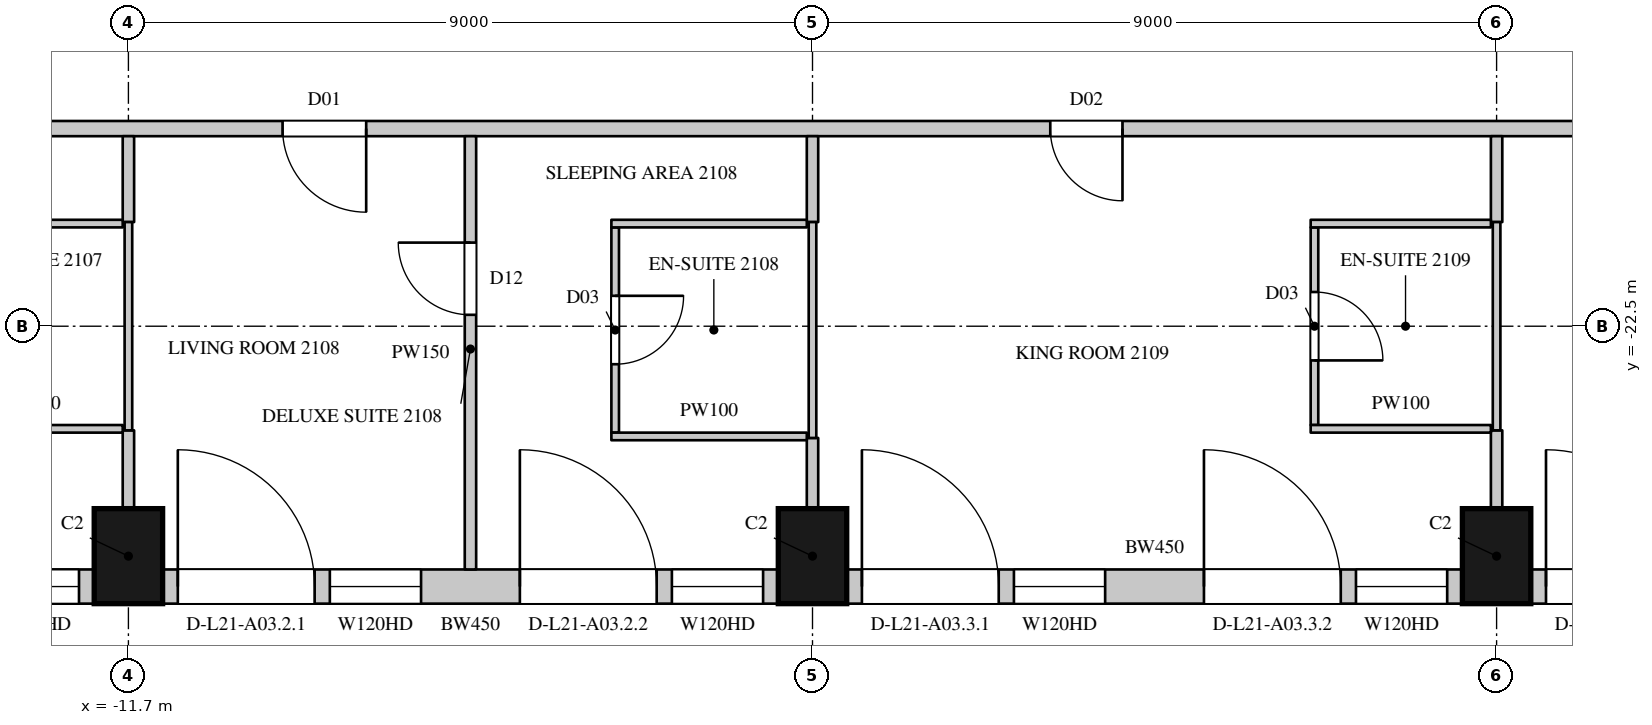
"""IFC4 building model, lengths in metres.
Left out: names, types, materials, properties, quantities, classifications, styles, units other than length and angle.
Written with IfcOpenShell. Run it as: python <this file> out.ifc"""

import sys

from ifc_helpers import new_model, si_unit, direction, frame, frame_2d, origin, origin_2d, place, context, subcontext, project, spatial, rectangle, extrude, element, fill, save


model = new_model("IFC4")
c1 = context("Model", 3, precision=1e-05, world=origin(), true_north=direction((0.0, 1.0)))
c2 = subcontext(c1, "Body", "Model", "MODEL_VIEW")
j1 = project(units=[si_unit("LENGTHUNIT", "METRE"), si_unit("PLANEANGLEUNIT", "RADIAN")], contexts=[c1])
p1 = place(None, origin())
s1 = spatial("IfcSite", under=j1, at=p1, CompositionType="ELEMENT")
p2 = place(p1, origin())
s2 = spatial("IfcBuilding", under=s1, at=p2, CompositionType="ELEMENT")
p3 = place(p2, frame((0.0, 0.0, 105.9)))
s3 = spatial("IfcBuildingStorey", under=s2, at=p3, CompositionType="ELEMENT", Elevation=105.9)
for number, where, z_axis, x_axis in (
    (1, (-11.7, -25.525, 0.0), (0.0, 0.0, 1.0), (1.0, 0.0, 0.0)),
    (2, (-2.7, -25.525, 0.0), (0.0, 0.0, 1.0), (1.0, 0.0, 0.0)),
    (3, (6.3, -25.525, 0.0), (0.0, 0.0, 1.0), (1.0, 0.0, 0.0)),
):
    element("IfcColumn", number, at=place(p3, frame(where, z_axis=z_axis, x_axis=x_axis)), inside=s3, PredefinedType="COLUMN", context=c2, shape_type="SweptSolid", body=[
        extrude(rectangle(XDim=0.9, YDim=1.25, at=origin_2d()), origin(), (0.0, 0.0, 1.0), 3.6),
    ])
p4 = place(p3, frame((-20.25, -25.925, 0.0), z_axis=(0.0, 0.0, 1.0), x_axis=(1.0, 0.0, 0.0)))
e4 = element("IfcWall", 4, at=p4, inside=s3, PredefinedType="SOLIDWALL", context=c2, shape_type="SweptSolid", body=[
    extrude(rectangle(XDim=8.1, YDim=0.45, at=frame_2d((4.05, 0.0))), origin(), (0.0, 0.0, 1.0), 3.3),
])
p5 = place(p4, frame((0.2, 0.0, 0.0)))
e5 = element("IfcOpeningElement", 5, at=p5, cuts=e4, PredefinedType="OPENING", context=c2, shape_type="SweptSolid", body=[
    extrude(rectangle(XDim=1.8, YDim=2.4, at=frame_2d((0.9, 1.2))), frame((0.0, 0.235, 0.0), z_axis=(0.0, -1.0, 0.0), x_axis=(1.0, 0.0, 0.0)), (0.0, 0.0, 1.0), 0.47),
])
p6 = place(p4, frame((2.2, 0.0, 1.05)))
e6 = element("IfcOpeningElement", 6, at=p6, cuts=e4, PredefinedType="OPENING", context=c2, shape_type="SweptSolid", body=[
    extrude(rectangle(XDim=1.2, YDim=2.0, at=frame_2d((0.6, 1.0))), frame((0.0, 0.235, 0.0), z_axis=(0.0, -1.0, 0.0), x_axis=(1.0, 0.0, 0.0)), (0.0, 0.0, 1.0), 0.47),
])
p7 = place(p4, frame((4.7, 0.0, 0.0)))
e7 = element("IfcOpeningElement", 7, at=p7, cuts=e4, PredefinedType="OPENING", context=c2, shape_type="SweptSolid", body=[
    extrude(rectangle(XDim=1.8, YDim=2.4, at=frame_2d((0.9, 1.2))), frame((0.0, 0.235, 0.0), z_axis=(0.0, -1.0, 0.0), x_axis=(1.0, 0.0, 0.0)), (0.0, 0.0, 1.0), 0.47),
])
p8 = place(p4, frame((6.7, 0.0, 1.05)))
e8 = element("IfcOpeningElement", 8, at=p8, cuts=e4, PredefinedType="OPENING", context=c2, shape_type="SweptSolid", body=[
    extrude(rectangle(XDim=1.2, YDim=2.0, at=frame_2d((0.6, 1.0))), frame((0.0, 0.235, 0.0), z_axis=(0.0, -1.0, 0.0), x_axis=(1.0, 0.0, 0.0)), (0.0, 0.0, 1.0), 0.47),
])
p9 = place(p3, frame((-11.25, -25.925, 0.0), z_axis=(0.0, 0.0, 1.0), x_axis=(1.0, 0.0, 0.0)))
e9 = element("IfcWall", 9, at=p9, inside=s3, PredefinedType="SOLIDWALL", context=c2, shape_type="SweptSolid", body=[
    extrude(rectangle(XDim=8.1, YDim=0.45, at=frame_2d((4.05, 0.0))), origin(), (0.0, 0.0, 1.0), 3.3),
])
p10 = place(p9, frame((0.2, 0.0, 0.0)))
e10 = element("IfcOpeningElement", 10, at=p10, cuts=e9, PredefinedType="OPENING", context=c2, shape_type="SweptSolid", body=[
    extrude(rectangle(XDim=1.8, YDim=2.4, at=frame_2d((0.9, 1.2))), frame((0.0, 0.235, 0.0), z_axis=(0.0, -1.0, 0.0), x_axis=(1.0, 0.0, 0.0)), (0.0, 0.0, 1.0), 0.47),
])
p11 = place(p9, frame((2.2, 0.0, 1.05)))
e11 = element("IfcOpeningElement", 11, at=p11, cuts=e9, PredefinedType="OPENING", context=c2, shape_type="SweptSolid", body=[
    extrude(rectangle(XDim=1.2, YDim=2.0, at=frame_2d((0.6, 1.0))), frame((0.0, 0.235, 0.0), z_axis=(0.0, -1.0, 0.0), x_axis=(1.0, 0.0, 0.0)), (0.0, 0.0, 1.0), 0.47),
])
p12 = place(p9, frame((4.7, 0.0, 0.0)))
e12 = element("IfcOpeningElement", 12, at=p12, cuts=e9, PredefinedType="OPENING", context=c2, shape_type="SweptSolid", body=[
    extrude(rectangle(XDim=1.8, YDim=2.4, at=frame_2d((0.9, 1.2))), frame((0.0, 0.235, 0.0), z_axis=(0.0, -1.0, 0.0), x_axis=(1.0, 0.0, 0.0)), (0.0, 0.0, 1.0), 0.47),
])
p13 = place(p9, frame((6.7, 0.0, 1.05)))
e13 = element("IfcOpeningElement", 13, at=p13, cuts=e9, PredefinedType="OPENING", context=c2, shape_type="SweptSolid", body=[
    extrude(rectangle(XDim=1.2, YDim=2.0, at=frame_2d((0.6, 1.0))), frame((0.0, 0.235, 0.0), z_axis=(0.0, -1.0, 0.0), x_axis=(1.0, 0.0, 0.0)), (0.0, 0.0, 1.0), 0.47),
])
p14 = place(p3, frame((-2.25, -25.925, 0.0), z_axis=(0.0, 0.0, 1.0), x_axis=(1.0, 0.0, 0.0)))
e14 = element("IfcWall", 14, at=p14, inside=s3, PredefinedType="SOLIDWALL", context=c2, shape_type="SweptSolid", body=[
    extrude(rectangle(XDim=8.1, YDim=0.45, at=frame_2d((4.05, 0.0))), origin(), (0.0, 0.0, 1.0), 3.3),
])
p15 = place(p14, frame((0.2, 0.0, 0.0)))
e15 = element("IfcOpeningElement", 15, at=p15, cuts=e14, PredefinedType="OPENING", context=c2, shape_type="SweptSolid", body=[
    extrude(rectangle(XDim=1.8, YDim=2.4, at=frame_2d((0.9, 1.2))), frame((0.0, 0.235, 0.0), z_axis=(0.0, -1.0, 0.0), x_axis=(1.0, 0.0, 0.0)), (0.0, 0.0, 1.0), 0.47),
])
p16 = place(p14, frame((2.2, 0.0, 1.05)))
e16 = element("IfcOpeningElement", 16, at=p16, cuts=e14, PredefinedType="OPENING", context=c2, shape_type="SweptSolid", body=[
    extrude(rectangle(XDim=1.2, YDim=2.0, at=frame_2d((0.6, 1.0))), frame((0.0, 0.235, 0.0), z_axis=(0.0, -1.0, 0.0), x_axis=(1.0, 0.0, 0.0)), (0.0, 0.0, 1.0), 0.47),
])
p17 = place(p14, frame((4.7, 0.0, 0.0)))
e17 = element("IfcOpeningElement", 17, at=p17, cuts=e14, PredefinedType="OPENING", context=c2, shape_type="SweptSolid", body=[
    extrude(rectangle(XDim=1.8, YDim=2.4, at=frame_2d((0.9, 1.2))), frame((0.0, 0.235, 0.0), z_axis=(0.0, -1.0, 0.0), x_axis=(1.0, 0.0, 0.0)), (0.0, 0.0, 1.0), 0.47),
])
p18 = place(p14, frame((6.7, 0.0, 1.05)))
e18 = element("IfcOpeningElement", 18, at=p18, cuts=e14, PredefinedType="OPENING", context=c2, shape_type="SweptSolid", body=[
    extrude(rectangle(XDim=1.2, YDim=2.0, at=frame_2d((0.6, 1.0))), frame((0.0, 0.235, 0.0), z_axis=(0.0, -1.0, 0.0), x_axis=(1.0, 0.0, 0.0)), (0.0, 0.0, 1.0), 0.47),
])
p19 = place(p3, frame((6.75, -25.925, 0.0), z_axis=(0.0, 0.0, 1.0), x_axis=(1.0, 0.0, 0.0)))
e19 = element("IfcWall", 19, at=p19, inside=s3, PredefinedType="SOLIDWALL", context=c2, shape_type="SweptSolid", body=[
    extrude(rectangle(XDim=8.1, YDim=0.45, at=frame_2d((4.05, 0.0))), origin(), (0.0, 0.0, 1.0), 3.3),
])
p20 = place(p19, frame((0.2, 0.0, 0.0)))
e20 = element("IfcOpeningElement", 20, at=p20, cuts=e19, PredefinedType="OPENING", context=c2, shape_type="SweptSolid", body=[
    extrude(rectangle(XDim=1.8, YDim=2.4, at=frame_2d((0.9, 1.2))), frame((0.0, 0.235, 0.0), z_axis=(0.0, -1.0, 0.0), x_axis=(1.0, 0.0, 0.0)), (0.0, 0.0, 1.0), 0.47),
])
p21 = place(p19, frame((2.2, 0.0, 1.05)))
e21 = element("IfcOpeningElement", 21, at=p21, cuts=e19, PredefinedType="OPENING", context=c2, shape_type="SweptSolid", body=[
    extrude(rectangle(XDim=1.2, YDim=2.0, at=frame_2d((0.6, 1.0))), frame((0.0, 0.235, 0.0), z_axis=(0.0, -1.0, 0.0), x_axis=(1.0, 0.0, 0.0)), (0.0, 0.0, 1.0), 0.47),
])
p22 = place(p19, frame((5.9, 0.0, 0.0)))
e22 = element("IfcOpeningElement", 22, at=p22, cuts=e19, PredefinedType="OPENING", context=c2, shape_type="SweptSolid", body=[
    extrude(rectangle(XDim=1.8, YDim=2.4, at=frame_2d((0.9, 1.2))), frame((0.0, 0.235, 0.0), z_axis=(0.0, -1.0, 0.0), x_axis=(1.0, 0.0, 0.0)), (0.0, 0.0, 1.0), 0.47),
])
p23 = place(p3, frame((-23.822, -19.9, 0.0), z_axis=(0.0, 0.0, 1.0), x_axis=(1.0, 0.0, 0.0)))
e23 = element("IfcWall", 23, at=p23, inside=s3, PredefinedType="PARTITIONING", context=c2, shape_type="SweptSolid", body=[
    extrude(rectangle(XDim=42.222, YDim=0.2, at=frame_2d((21.111, 0.0))), origin(), (0.0, 0.0, 1.0), 3.3),
])
p24 = place(p23, frame((6.25, 0.0, 0.0)))
e24 = element("IfcOpeningElement", 24, at=p24, cuts=e23, PredefinedType="OPENING", context=c2, shape_type="SweptSolid", body=[
    extrude(rectangle(XDim=0.95, YDim=2.2, at=frame_2d((0.475, 1.1))), frame((0.0, 0.11, 0.0), z_axis=(0.0, -1.0, 0.0), x_axis=(1.0, 0.0, 0.0)), (0.0, 0.0, 1.0), 0.22),
])
p25 = place(p23, frame((14.15, 0.0, 0.0)))
e25 = element("IfcOpeningElement", 25, at=p25, cuts=e23, PredefinedType="OPENING", context=c2, shape_type="SweptSolid", body=[
    extrude(rectangle(XDim=1.1, YDim=2.4, at=frame_2d((0.55, 1.2))), frame((0.0, 0.11, 0.0), z_axis=(0.0, -1.0, 0.0), x_axis=(1.0, 0.0, 0.0)), (0.0, 0.0, 1.0), 0.22),
])
p26 = place(p23, frame((24.25, 0.0, 0.0)))
e26 = element("IfcOpeningElement", 26, at=p26, cuts=e23, PredefinedType="OPENING", context=c2, shape_type="SweptSolid", body=[
    extrude(rectangle(XDim=0.95, YDim=2.2, at=frame_2d((0.475, 1.1))), frame((0.0, 0.11, 0.0), z_axis=(0.0, -1.0, 0.0), x_axis=(1.0, 0.0, 0.0)), (0.0, 0.0, 1.0), 0.22),
])
p27 = place(p23, frame((32.95, 0.0, 0.0)))
e27 = element("IfcOpeningElement", 27, at=p27, cuts=e23, PredefinedType="OPENING", context=c2, shape_type="SweptSolid", body=[
    extrude(rectangle(XDim=1.1, YDim=2.4, at=frame_2d((0.55, 1.2))), frame((0.0, 0.11, 0.0), z_axis=(0.0, -1.0, 0.0), x_axis=(1.0, 0.0, 0.0)), (0.0, 0.0, 1.0), 0.22),
])
p28 = place(p3, frame((-11.7, -24.9, 0.0), z_axis=(0.0, 0.0, 1.0), x_axis=(0.0, 1.0, 0.0)))
e28 = element("IfcWall", 28, at=p28, inside=s3, PredefinedType="PARTITIONING", context=c2, shape_type="SweptSolid", body=[
    extrude(rectangle(XDim=1.03, YDim=0.15, at=frame_2d((0.515, 0.0))), origin(), (0.0, 0.0, 1.0), 2.75),
])
p29 = place(p3, frame((-11.7, -21.13, 0.0), z_axis=(0.0, 0.0, 1.0), x_axis=(0.0, 1.0, 0.0)))
e29 = element("IfcWall", 29, at=p29, inside=s3, PredefinedType="PARTITIONING", context=c2, shape_type="SweptSolid", body=[
    extrude(rectangle(XDim=1.13, YDim=0.15, at=frame_2d((0.565, 0.0))), origin(), (0.0, 0.0, 1.0), 2.75),
])
p30 = place(p3, frame((-7.2, -25.7, 0.0), z_axis=(0.0, 0.0, 1.0), x_axis=(0.0, 1.0, 0.0)))
e30 = element("IfcWall", 30, at=p30, inside=s3, PredefinedType="PARTITIONING", context=c2, shape_type="SweptSolid", body=[
    extrude(rectangle(XDim=5.7, YDim=0.15, at=frame_2d((2.85, 0.0))), origin(), (0.0, 0.0, 1.0), 2.65),
])
p31 = place(p30, frame((3.35, 0.0, 0.0)))
e31 = element("IfcOpeningElement", 31, at=p31, cuts=e30, PredefinedType="OPENING", context=c2, shape_type="SweptSolid", body=[
    extrude(rectangle(XDim=0.95, YDim=2.2, at=frame_2d((0.475, 1.1))), frame((0.0, 0.085, 0.0), z_axis=(0.0, -1.0, 0.0), x_axis=(1.0, 0.0, 0.0)), (0.0, 0.0, 1.0), 0.17),
])
p32 = place(p3, frame((-2.7, -24.9, 0.0), z_axis=(0.0, 0.0, 1.0), x_axis=(0.0, 1.0, 0.0)))
e32 = element("IfcWall", 32, at=p32, inside=s3, PredefinedType="PARTITIONING", context=c2, shape_type="SweptSolid", body=[
    extrude(rectangle(XDim=0.93, YDim=0.15, at=frame_2d((0.465, 0.0))), origin(), (0.0, 0.0, 1.0), 2.75),
])
p33 = place(p3, frame((-2.7, -21.13, 0.0), z_axis=(0.0, 0.0, 1.0), x_axis=(0.0, 1.0, 0.0)))
e33 = element("IfcWall", 33, at=p33, inside=s3, PredefinedType="PARTITIONING", context=c2, shape_type="SweptSolid", body=[
    extrude(rectangle(XDim=1.13, YDim=0.15, at=frame_2d((0.565, 0.0))), origin(), (0.0, 0.0, 1.0), 2.75),
])
p34 = place(p3, frame((6.3, -24.9, 0.0), z_axis=(0.0, 0.0, 1.0), x_axis=(0.0, 1.0, 0.0)))
e34 = element("IfcWall", 34, at=p34, inside=s3, PredefinedType="PARTITIONING", context=c2, shape_type="SweptSolid", body=[
    extrude(rectangle(XDim=1.03, YDim=0.15, at=frame_2d((0.515, 0.0))), origin(), (0.0, 0.0, 1.0), 2.75),
])
p35 = place(p3, frame((6.3, -21.13, 0.0), z_axis=(0.0, 0.0, 1.0), x_axis=(0.0, 1.0, 0.0)))
e35 = element("IfcWall", 35, at=p35, inside=s3, PredefinedType="PARTITIONING", context=c2, shape_type="SweptSolid", body=[
    extrude(rectangle(XDim=1.13, YDim=0.15, at=frame_2d((0.565, 0.0))), origin(), (0.0, 0.0, 1.0), 2.75),
])
for number, where, z_axis, x_axis in (
    (36, (-14.146, -23.85, 0.0), (0.0, 0.0, 1.0), (1.0, 0.0, 0.0)),
    (37, (-14.146, -21.15, 0.0), (0.0, 0.0, 1.0), (1.0, 0.0, 0.0)),
):
    element("IfcWall", number, at=place(p3, frame(where, z_axis=z_axis, x_axis=x_axis)), inside=s3, PredefinedType="PARTITIONING", context=c2, shape_type="SweptSolid", body=[
        extrude(rectangle(XDim=2.371, YDim=0.1, at=frame_2d((1.186, 0.0))), origin(), (0.0, 0.0, 1.0), 3.3),
    ])
p36 = place(p3, frame((-11.7, -23.87, 0.0), z_axis=(0.0, 0.0, 1.0), x_axis=(0.0, 1.0, 0.0)))
e38 = element("IfcWall", 38, at=p36, inside=s3, PredefinedType="PARTITIONING", context=c2, shape_type="SweptSolid", body=[
    extrude(rectangle(XDim=2.74, YDim=0.1, at=frame_2d((1.37, 0.0))), origin(), (0.0, 0.0, 1.0), 2.75),
])
p37 = place(p3, frame((-5.296, -23.9, 0.0), z_axis=(0.0, 0.0, 1.0), x_axis=(0.0, 1.0, 0.0)))
e39 = element("IfcWall", 39, at=p37, inside=s3, PredefinedType="PARTITIONING", context=c2, shape_type="SweptSolid", body=[
    extrude(rectangle(XDim=2.7, YDim=0.1, at=frame_2d((1.35, 0.0))), origin(), (0.0, 0.0, 1.0), 3.3),
])
p38 = place(p37, frame((0.9, 0.0, 0.0)))
e40 = element("IfcOpeningElement", 40, at=p38, cuts=e39, PredefinedType="OPENING", context=c2, shape_type="SweptSolid", body=[
    extrude(rectangle(XDim=0.9, YDim=2.2, at=frame_2d((0.45, 1.1))), frame((0.0, 0.06, 0.0), z_axis=(0.0, -1.0, 0.0), x_axis=(1.0, 0.0, 0.0)), (0.0, 0.0, 1.0), 0.12),
])
for number, where, z_axis, x_axis in (
    (41, (-5.346, -23.95, 0.0), (0.0, 0.0, 1.0), (1.0, 0.0, 0.0)),
    (42, (-5.346, -21.15, 0.0), (0.0, 0.0, 1.0), (1.0, 0.0, 0.0)),
):
    element("IfcWall", number, at=place(p3, frame(where, z_axis=z_axis, x_axis=x_axis)), inside=s3, PredefinedType="PARTITIONING", context=c2, shape_type="SweptSolid", body=[
        extrude(rectangle(XDim=2.571, YDim=0.1, at=frame_2d((1.286, 0.0))), origin(), (0.0, 0.0, 1.0), 3.3),
    ])
p39 = place(p3, frame((-2.7, -23.97, 0.0), z_axis=(0.0, 0.0, 1.0), x_axis=(0.0, 1.0, 0.0)))
e43 = element("IfcWall", 43, at=p39, inside=s3, PredefinedType="PARTITIONING", context=c2, shape_type="SweptSolid", body=[
    extrude(rectangle(XDim=2.84, YDim=0.1, at=frame_2d((1.42, 0.0))), origin(), (0.0, 0.0, 1.0), 2.75),
])
p40 = place(p3, frame((3.904, -23.8, 0.0), z_axis=(0.0, 0.0, 1.0), x_axis=(0.0, 1.0, 0.0)))
e44 = element("IfcWall", 44, at=p40, inside=s3, PredefinedType="PARTITIONING", context=c2, shape_type="SweptSolid", body=[
    extrude(rectangle(XDim=2.6, YDim=0.1, at=frame_2d((1.3, 0.0))), origin(), (0.0, 0.0, 1.0), 3.3),
])
p41 = place(p40, frame((0.85, 0.0, 0.0)))
e45 = element("IfcOpeningElement", 45, at=p41, cuts=e44, PredefinedType="OPENING", context=c2, shape_type="SweptSolid", body=[
    extrude(rectangle(XDim=0.9, YDim=2.2, at=frame_2d((0.45, 1.1))), frame((0.0, 0.06, 0.0), z_axis=(0.0, -1.0, 0.0), x_axis=(1.0, 0.0, 0.0)), (0.0, 0.0, 1.0), 0.12),
])
for number, where, z_axis, x_axis in (
    (46, (3.854, -23.85, 0.0), (0.0, 0.0, 1.0), (1.0, 0.0, 0.0)),
    (47, (3.854, -21.15, 0.0), (0.0, 0.0, 1.0), (1.0, 0.0, 0.0)),
):
    element("IfcWall", number, at=place(p3, frame(where, z_axis=z_axis, x_axis=x_axis)), inside=s3, PredefinedType="PARTITIONING", context=c2, shape_type="SweptSolid", body=[
        extrude(rectangle(XDim=2.371, YDim=0.1, at=frame_2d((1.186, 0.0))), origin(), (0.0, 0.0, 1.0), 3.3),
    ])
p42 = place(p3, frame((6.3, -23.87, 0.0), z_axis=(0.0, 0.0, 1.0), x_axis=(0.0, 1.0, 0.0)))
e48 = element("IfcWall", 48, at=p42, inside=s3, PredefinedType="PARTITIONING", context=c2, shape_type="SweptSolid", body=[
    extrude(rectangle(XDim=2.74, YDim=0.1, at=frame_2d((1.37, 0.0))), origin(), (0.0, 0.0, 1.0), 2.75),
])
p43 = place(p8, origin())
e49 = element("IfcWindow", 49, at=p43, inside=s3, PartitioningType="SINGLE_PANEL", PredefinedType="WINDOW", context=c2, shape_type="SweptSolid", body=[
    extrude(rectangle(XDim=1.2, YDim=2.0, at=frame_2d((0.6, 1.0))), frame((0.0, 0.135, 0.0), z_axis=(0.0, -1.0, 0.0), x_axis=(1.0, 0.0, 0.0)), (0.0, 0.0, 1.0), 0.06),
])
fill(e8, e49)
p44 = place(p10, origin())
e50 = element("IfcDoor", 50, at=p44, inside=s3, OperationType="SLIDING_TO_LEFT", PredefinedType="DOOR", context=c2, shape_type="SweptSolid", body=[
    extrude(rectangle(XDim=1.8, YDim=2.4, at=frame_2d((0.9, 1.2))), frame((0.0, 0.13, 0.0), z_axis=(0.0, -1.0, 0.0), x_axis=(1.0, 0.0, 0.0)), (0.0, 0.0, 1.0), 0.05),
])
fill(e10, e50)
p45 = place(p11, origin())
e51 = element("IfcWindow", 51, at=p45, inside=s3, PartitioningType="SINGLE_PANEL", PredefinedType="WINDOW", context=c2, shape_type="SweptSolid", body=[
    extrude(rectangle(XDim=1.2, YDim=2.0, at=frame_2d((0.6, 1.0))), frame((0.0, 0.135, 0.0), z_axis=(0.0, -1.0, 0.0), x_axis=(1.0, 0.0, 0.0)), (0.0, 0.0, 1.0), 0.06),
])
fill(e11, e51)
p46 = place(p12, origin())
e52 = element("IfcDoor", 52, at=p46, inside=s3, OperationType="SLIDING_TO_LEFT", PredefinedType="DOOR", context=c2, shape_type="SweptSolid", body=[
    extrude(rectangle(XDim=1.8, YDim=2.4, at=frame_2d((0.9, 1.2))), frame((0.0, 0.13, 0.0), z_axis=(0.0, -1.0, 0.0), x_axis=(1.0, 0.0, 0.0)), (0.0, 0.0, 1.0), 0.05),
])
fill(e12, e52)
p47 = place(p13, origin())
e53 = element("IfcWindow", 53, at=p47, inside=s3, PartitioningType="SINGLE_PANEL", PredefinedType="WINDOW", context=c2, shape_type="SweptSolid", body=[
    extrude(rectangle(XDim=1.2, YDim=2.0, at=frame_2d((0.6, 1.0))), frame((0.0, 0.135, 0.0), z_axis=(0.0, -1.0, 0.0), x_axis=(1.0, 0.0, 0.0)), (0.0, 0.0, 1.0), 0.06),
])
fill(e13, e53)
p48 = place(p15, origin())
e54 = element("IfcDoor", 54, at=p48, inside=s3, OperationType="SLIDING_TO_LEFT", PredefinedType="DOOR", context=c2, shape_type="SweptSolid", body=[
    extrude(rectangle(XDim=1.8, YDim=2.4, at=frame_2d((0.9, 1.2))), frame((0.0, 0.13, 0.0), z_axis=(0.0, -1.0, 0.0), x_axis=(1.0, 0.0, 0.0)), (0.0, 0.0, 1.0), 0.05),
])
fill(e15, e54)
p49 = place(p16, origin())
e55 = element("IfcWindow", 55, at=p49, inside=s3, PartitioningType="SINGLE_PANEL", PredefinedType="WINDOW", context=c2, shape_type="SweptSolid", body=[
    extrude(rectangle(XDim=1.2, YDim=2.0, at=frame_2d((0.6, 1.0))), frame((0.0, 0.135, 0.0), z_axis=(0.0, -1.0, 0.0), x_axis=(1.0, 0.0, 0.0)), (0.0, 0.0, 1.0), 0.06),
])
fill(e16, e55)
p50 = place(p17, origin())
e56 = element("IfcDoor", 56, at=p50, inside=s3, OperationType="SLIDING_TO_LEFT", PredefinedType="DOOR", context=c2, shape_type="SweptSolid", body=[
    extrude(rectangle(XDim=1.8, YDim=2.4, at=frame_2d((0.9, 1.2))), frame((0.0, 0.13, 0.0), z_axis=(0.0, -1.0, 0.0), x_axis=(1.0, 0.0, 0.0)), (0.0, 0.0, 1.0), 0.05),
])
fill(e17, e56)
p51 = place(p18, origin())
e57 = element("IfcWindow", 57, at=p51, inside=s3, PartitioningType="SINGLE_PANEL", PredefinedType="WINDOW", context=c2, shape_type="SweptSolid", body=[
    extrude(rectangle(XDim=1.2, YDim=2.0, at=frame_2d((0.6, 1.0))), frame((0.0, 0.135, 0.0), z_axis=(0.0, -1.0, 0.0), x_axis=(1.0, 0.0, 0.0)), (0.0, 0.0, 1.0), 0.06),
])
fill(e18, e57)
p52 = place(p20, origin())
e58 = element("IfcDoor", 58, at=p52, inside=s3, OperationType="SLIDING_TO_LEFT", PredefinedType="DOOR", context=c2, shape_type="SweptSolid", body=[
    extrude(rectangle(XDim=1.8, YDim=2.4, at=frame_2d((0.9, 1.2))), frame((0.0, 0.13, 0.0), z_axis=(0.0, -1.0, 0.0), x_axis=(1.0, 0.0, 0.0)), (0.0, 0.0, 1.0), 0.05),
])
fill(e20, e58)
p53 = place(p25, origin())
e59 = element("IfcDoor", 59, at=p53, inside=s3, OperationType="SINGLE_SWING_LEFT", PredefinedType="DOOR", context=c2, shape_type="SweptSolid", body=[
    extrude(rectangle(XDim=1.1, YDim=2.4, at=frame_2d((0.55, 1.2))), frame((0.0, 0.025, 0.0), z_axis=(0.0, -1.0, 0.0), x_axis=(1.0, 0.0, 0.0)), (0.0, 0.0, 1.0), 0.05),
])
fill(e25, e59)
p54 = place(p31, origin())
e60 = element("IfcDoor", 60, at=p54, inside=s3, OperationType="SINGLE_SWING_RIGHT", PredefinedType="DOOR", context=c2, shape_type="SweptSolid", body=[
    extrude(rectangle(XDim=0.95, YDim=2.2, at=frame_2d((0.475, 1.1))), frame((0.0, 0.025, 0.0), z_axis=(0.0, -1.0, 0.0), x_axis=(1.0, 0.0, 0.0)), (0.0, 0.0, 1.0), 0.05),
])
fill(e31, e60)
p55 = place(p38, origin())
e61 = element("IfcDoor", 61, at=p55, inside=s3, OperationType="SINGLE_SWING_LEFT", PredefinedType="DOOR", context=c2, shape_type="SweptSolid", body=[
    extrude(rectangle(XDim=0.9, YDim=2.2, at=frame_2d((0.45, 1.1))), frame((0.0, 0.025, 0.0), z_axis=(0.0, -1.0, 0.0), x_axis=(1.0, 0.0, 0.0)), (0.0, 0.0, 1.0), 0.05),
])
fill(e40, e61)
p56 = place(p26, origin())
e62 = element("IfcDoor", 62, at=p56, inside=s3, OperationType="SINGLE_SWING_LEFT", PredefinedType="DOOR", context=c2, shape_type="SweptSolid", body=[
    extrude(rectangle(XDim=0.95, YDim=2.2, at=frame_2d((0.475, 1.1))), frame((0.0, 0.025, 0.0), z_axis=(0.0, -1.0, 0.0), x_axis=(1.0, 0.0, 0.0)), (0.0, 0.0, 1.0), 0.05),
])
fill(e26, e62)
p57 = place(p41, origin())
e63 = element("IfcDoor", 63, at=p57, inside=s3, OperationType="SINGLE_SWING_RIGHT", PredefinedType="DOOR", context=c2, shape_type="SweptSolid", body=[
    extrude(rectangle(XDim=0.9, YDim=2.2, at=frame_2d((0.45, 1.1))), frame((0.0, 0.025, 0.0), z_axis=(0.0, -1.0, 0.0), x_axis=(1.0, 0.0, 0.0)), (0.0, 0.0, 1.0), 0.05),
])
fill(e45, e63)
save(model, sys.argv[1])
